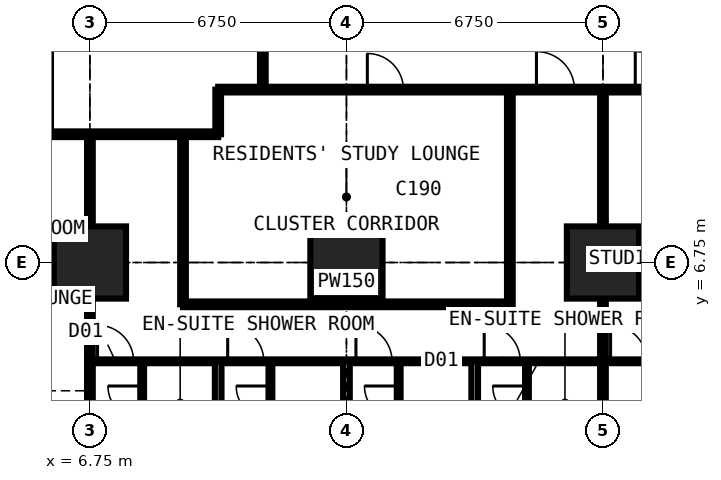
"""IFC4 building model, lengths in metres.
Left out: names, types, materials, properties, quantities, classifications, styles, units other than length and angle.
Written with IfcOpenShell. Run it as: python <this file> out.ifc"""

import sys

from ifc_helpers import new_model, si_unit, direction, frame, frame_2d, origin, origin_2d, place, context, subcontext, project, spatial, rectangle, extrude, element, fill, save


model = new_model("IFC4")
c1 = context("Model", 3, precision=1e-05, world=origin(), true_north=direction((0.0, 1.0)))
c2 = subcontext(c1, "Body", "Model", "MODEL_VIEW")
j1 = project(units=[si_unit("LENGTHUNIT", "METRE"), si_unit("PLANEANGLEUNIT", "RADIAN")], contexts=[c1])
p1 = place(None, origin())
s1 = spatial("IfcSite", under=j1, at=p1, CompositionType="ELEMENT")
p2 = place(p1, origin())
s2 = spatial("IfcBuilding", under=s1, at=p2, CompositionType="ELEMENT")
p3 = place(p2, frame((0.0, 0.0, 43.2)))
s3 = spatial("IfcBuildingStorey", under=s2, at=p3, CompositionType="ELEMENT", Elevation=43.2)
for number, where, z_axis, x_axis in (
    (1, (6.75, 6.75, 0.0), (0.0, 0.0, 1.0), (1.0, 0.0, 0.0)),
    (2, (13.5, 6.75, 0.0), (0.0, 0.0, 1.0), (1.0, 0.0, 0.0)),
    (3, (20.25, 6.75, 0.0), (0.0, 0.0, 1.0), (1.0, 0.0, 0.0)),
):
    element("IfcColumn", number, at=place(p3, frame(where, z_axis=z_axis, x_axis=x_axis)), inside=s3, PredefinedType="COLUMN", context=c2, shape_type="SweptSolid", body=[
        extrude(rectangle(XDim=1.9, YDim=1.9, at=origin_2d()), origin(), (0.0, 0.0, 1.0), 3.6),
    ])
p4 = place(p3, frame((-0.734, 10.125, 0.0), z_axis=(0.0, 0.0, 1.0), x_axis=(1.0, 0.0, 0.0)))
e4 = element("IfcWall", 4, at=p4, inside=s3, PredefinedType="PARTITIONING", context=c2, shape_type="SweptSolid", body=[
    extrude(rectangle(XDim=10.859, YDim=0.15, at=frame_2d((5.429, 0.0))), origin(), (0.0, 0.0, 1.0), 3.375),
])
p5 = place(p4, frame((5.134, 0.0, 0.0)))
e5 = element("IfcOpeningElement", 5, at=p5, cuts=e4, PredefinedType="OPENING", context=c2, shape_type="SweptSolid", body=[
    extrude(rectangle(XDim=1.0, YDim=2.2, at=frame_2d((0.5, 1.1))), frame((0.0, 0.085, 0.0), z_axis=(0.0, -1.0, 0.0), x_axis=(1.0, 0.0, 0.0)), (0.0, 0.0, 1.0), 0.17),
])
p6 = place(p3, frame((6.75, -0.734, 0.0), z_axis=(0.0, 0.0, 1.0), x_axis=(0.0, 1.0, 0.0)))
e6 = element("IfcWall", 6, at=p6, inside=s3, PredefinedType="PARTITIONING", context=c2, shape_type="SweptSolid", body=[
    extrude(rectangle(XDim=10.859, YDim=0.15, at=frame_2d((5.429, 0.0))), origin(), (0.0, 0.0, 1.0), 2.877),
])
p7 = place(p3, frame((6.75, 4.15, 0.0), z_axis=(0.0, 0.0, 1.0), x_axis=(1.0, 0.0, 0.0)))
e7 = element("IfcWall", 7, at=p7, inside=s3, PredefinedType="PARTITIONING", context=c2, shape_type="SweptSolid", body=[
    extrude(rectangle(XDim=23.625, YDim=0.1, at=frame_2d((11.812, 0.0))), origin(), (0.0, 0.0, 1.0), 3.375),
])
p8 = place(p7, frame((0.2, 0.0, 0.0)))
e8 = element("IfcOpeningElement", 8, at=p8, cuts=e7, PredefinedType="OPENING", context=c2, shape_type="SweptSolid", body=[
    extrude(rectangle(XDim=0.95, YDim=2.2, at=frame_2d((0.475, 1.1))), frame((0.0, 0.06, 0.0), z_axis=(0.0, -1.0, 0.0), x_axis=(1.0, 0.0, 0.0)), (0.0, 0.0, 1.0), 0.12),
])
p9 = place(p7, frame((3.625, 0.0, 0.0)))
e9 = element("IfcOpeningElement", 9, at=p9, cuts=e7, PredefinedType="OPENING", context=c2, shape_type="SweptSolid", body=[
    extrude(rectangle(XDim=0.95, YDim=2.2, at=frame_2d((0.475, 1.1))), frame((0.0, 0.06, 0.0), z_axis=(0.0, -1.0, 0.0), x_axis=(1.0, 0.0, 0.0)), (0.0, 0.0, 1.0), 0.12),
])
p10 = place(p7, frame((7.0, 0.0, 0.0)))
e10 = element("IfcOpeningElement", 10, at=p10, cuts=e7, PredefinedType="OPENING", context=c2, shape_type="SweptSolid", body=[
    extrude(rectangle(XDim=0.95, YDim=2.2, at=frame_2d((0.475, 1.1))), frame((0.0, 0.06, 0.0), z_axis=(0.0, -1.0, 0.0), x_axis=(1.0, 0.0, 0.0)), (0.0, 0.0, 1.0), 0.12),
])
p11 = place(p7, frame((10.375, 0.0, 0.0)))
e11 = element("IfcOpeningElement", 11, at=p11, cuts=e7, PredefinedType="OPENING", context=c2, shape_type="SweptSolid", body=[
    extrude(rectangle(XDim=0.95, YDim=2.2, at=frame_2d((0.475, 1.1))), frame((0.0, 0.06, 0.0), z_axis=(0.0, -1.0, 0.0), x_axis=(1.0, 0.0, 0.0)), (0.0, 0.0, 1.0), 0.12),
])
p12 = place(p7, frame((18.475, 0.0, 0.0)))
e12 = element("IfcOpeningElement", 12, at=p12, cuts=e7, PredefinedType="OPENING", context=c2, shape_type="SweptSolid", body=[
    extrude(rectangle(XDim=0.95, YDim=2.2, at=frame_2d((0.475, 1.1))), frame((0.0, 0.06, 0.0), z_axis=(0.0, -1.0, 0.0), x_axis=(1.0, 0.0, 0.0)), (0.0, 0.0, 1.0), 0.12),
])
p13 = place(p7, frame((13.7, 0.0, 0.0)))
e13 = element("IfcOpeningElement", 13, at=p13, cuts=e7, PredefinedType="OPENING", context=c2, shape_type="SweptSolid", body=[
    extrude(rectangle(XDim=0.95, YDim=2.2, at=frame_2d((0.475, 1.1))), frame((0.0, 0.06, 0.0), z_axis=(0.0, -1.0, 0.0), x_axis=(1.0, 0.0, 0.0)), (0.0, 0.0, 1.0), 0.12),
])
p14 = place(p3, frame((8.125, 1.95, 0.0), z_axis=(0.0, 0.0, 1.0), x_axis=(0.0, 1.0, 0.0)))
e14 = element("IfcWall", 14, at=p14, inside=s3, PredefinedType="PARTITIONING", context=c2, shape_type="SweptSolid", body=[
    extrude(rectangle(XDim=2.2, YDim=0.1, at=frame_2d((1.1, 0.0))), origin(), (0.0, 0.0, 1.0), 3.375),
])
p15 = place(p14, frame((0.65, 0.0, 0.0)))
e15 = element("IfcOpeningElement", 15, at=p15, cuts=e14, PredefinedType="OPENING", context=c2, shape_type="SweptSolid", body=[
    extrude(rectangle(XDim=0.9, YDim=2.2, at=frame_2d((0.45, 1.1))), frame((0.0, 0.06, 0.0), z_axis=(0.0, -1.0, 0.0), x_axis=(1.0, 0.0, 0.0)), (0.0, 0.0, 1.0), 0.12),
])
p16 = place(p3, frame((9.2, 5.65, 0.0), z_axis=(0.0, 0.0, 1.0), x_axis=(0.0, 1.0, 0.0)))
e16 = element("IfcWall", 16, at=p16, inside=s3, PredefinedType="PARTITIONING", context=c2, shape_type="SweptSolid", body=[
    extrude(rectangle(XDim=4.475, YDim=0.15, at=frame_2d((2.238, 0.0))), origin(), (0.0, 0.0, 1.0), 3.375),
])
p17 = place(p3, frame((9.2, 5.65, 0.0), z_axis=(0.0, 0.0, 1.0), x_axis=(1.0, 0.0, 0.0)))
e17 = element("IfcWall", 17, at=p17, inside=s3, PredefinedType="PARTITIONING", context=c2, shape_type="SweptSolid", body=[
    extrude(rectangle(XDim=8.6, YDim=0.15, at=frame_2d((4.3, 0.0))), origin(), (0.0, 0.0, 1.0), 3.375),
])
p18 = place(p3, frame((10.125, -0.734, 0.0), z_axis=(0.0, 0.0, 1.0), x_axis=(0.0, 1.0, 0.0)))
e18 = element("IfcWall", 18, at=p18, inside=s3, PredefinedType="PARTITIONING", context=c2, shape_type="SweptSolid", body=[
    extrude(rectangle(XDim=4.884, YDim=0.175, at=frame_2d((2.442, 0.0))), origin(), (0.0, 0.0, 1.0), 3.375),
])
p19 = place(p3, frame((10.125, 10.125, 0.0), z_axis=(0.0, 0.0, 1.0), x_axis=(0.0, 1.0, 0.0)))
e19 = element("IfcWall", 19, at=p19, inside=s3, PredefinedType="PARTITIONING", context=c2, shape_type="SweptSolid", body=[
    extrude(rectangle(XDim=1.175, YDim=0.15, at=frame_2d((0.587, 0.0))), origin(), (0.0, 0.0, 1.0), 3.375),
])
p20 = place(p3, frame((10.125, 11.3, 0.0), z_axis=(0.0, 0.0, 1.0), x_axis=(1.0, 0.0, 0.0)))
e20 = element("IfcWall", 20, at=p20, inside=s3, PredefinedType="PARTITIONING", context=c2, shape_type="SweptSolid", body=[
    extrude(rectangle(XDim=20.675, YDim=0.15, at=frame_2d((10.337, 0.0))), origin(), (0.0, 0.0, 1.0), 3.375),
])
p21 = place(p20, frame((8.375, 0.0, 0.0)))
e21 = element("IfcOpeningElement", 21, at=p21, cuts=e20, PredefinedType="OPENING", context=c2, shape_type="SweptSolid", body=[
    extrude(rectangle(XDim=1.0, YDim=2.2, at=frame_2d((0.5, 1.1))), frame((0.0, 0.085, 0.0), z_axis=(0.0, -1.0, 0.0), x_axis=(1.0, 0.0, 0.0)), (0.0, 0.0, 1.0), 0.17),
])
p22 = place(p20, frame((10.975, 0.0, 0.0)))
e22 = element("IfcOpeningElement", 22, at=p22, cuts=e20, PredefinedType="OPENING", context=c2, shape_type="SweptSolid", body=[
    extrude(rectangle(XDim=1.0, YDim=2.2, at=frame_2d((0.5, 1.1))), frame((0.0, 0.085, 0.0), z_axis=(0.0, -1.0, 0.0), x_axis=(1.0, 0.0, 0.0)), (0.0, 0.0, 1.0), 0.17),
])
p23 = place(p20, frame((3.925, 0.0, 0.0)))
e23 = element("IfcOpeningElement", 23, at=p23, cuts=e20, PredefinedType="OPENING", context=c2, shape_type="SweptSolid", body=[
    extrude(rectangle(XDim=0.95, YDim=2.2, at=frame_2d((0.475, 1.1))), frame((0.0, 0.085, 0.0), z_axis=(0.0, -1.0, 0.0), x_axis=(1.0, 0.0, 0.0)), (0.0, 0.0, 1.0), 0.17),
])
p24 = place(p3, frame((11.3, 11.3, 0.0), z_axis=(0.0, 0.0, 1.0), x_axis=(0.0, 1.0, 0.0)))
e24 = element("IfcWall", 24, at=p24, inside=s3, PredefinedType="PARTITIONING", context=c2, shape_type="SweptSolid", body=[
    extrude(rectangle(XDim=19.075, YDim=0.15, at=frame_2d((9.538, 0.0))), origin(), (0.0, 0.0, 1.0), 3.375),
])
p25 = place(p24, frame((12.875, 0.0, 0.0)))
e25 = element("IfcOpeningElement", 25, at=p25, cuts=e24, PredefinedType="OPENING", context=c2, shape_type="SweptSolid", body=[
    extrude(rectangle(XDim=1.0, YDim=2.2, at=frame_2d((0.5, 1.1))), frame((0.0, 0.085, 0.0), z_axis=(0.0, -1.0, 0.0), x_axis=(1.0, 0.0, 0.0)), (0.0, 0.0, 1.0), 0.17),
])
p26 = place(p24, frame((10.438, 0.0, 0.0)))
e26 = element("IfcOpeningElement", 26, at=p26, cuts=e24, PredefinedType="OPENING", context=c2, shape_type="SweptSolid", body=[
    extrude(rectangle(XDim=1.0, YDim=2.2, at=frame_2d((0.5, 1.1))), frame((0.0, 0.085, 0.0), z_axis=(0.0, -1.0, 0.0), x_axis=(1.0, 0.0, 0.0)), (0.0, 0.0, 1.0), 0.17),
])
p27 = place(p24, frame((15.675, 0.0, 0.0)))
e27 = element("IfcOpeningElement", 27, at=p27, cuts=e24, PredefinedType="OPENING", context=c2, shape_type="SweptSolid", body=[
    extrude(rectangle(XDim=0.95, YDim=2.2, at=frame_2d((0.475, 1.1))), frame((0.0, 0.085, 0.0), z_axis=(0.0, -1.0, 0.0), x_axis=(1.0, 0.0, 0.0)), (0.0, 0.0, 1.0), 0.17),
])
p28 = place(p3, frame((11.5, 1.95, 0.0), z_axis=(0.0, 0.0, 1.0), x_axis=(0.0, 1.0, 0.0)))
e28 = element("IfcWall", 28, at=p28, inside=s3, PredefinedType="PARTITIONING", context=c2, shape_type="SweptSolid", body=[
    extrude(rectangle(XDim=2.2, YDim=0.1, at=frame_2d((1.1, 0.0))), origin(), (0.0, 0.0, 1.0), 3.375),
])
p29 = place(p28, frame((0.65, 0.0, 0.0)))
e29 = element("IfcOpeningElement", 29, at=p29, cuts=e28, PredefinedType="OPENING", context=c2, shape_type="SweptSolid", body=[
    extrude(rectangle(XDim=0.9, YDim=2.2, at=frame_2d((0.45, 1.1))), frame((0.0, 0.06, 0.0), z_axis=(0.0, -1.0, 0.0), x_axis=(1.0, 0.0, 0.0)), (0.0, 0.0, 1.0), 0.12),
])
p30 = place(p3, frame((13.5, -0.734, 0.0), z_axis=(0.0, 0.0, 1.0), x_axis=(0.0, 1.0, 0.0)))
e30 = element("IfcWall", 30, at=p30, inside=s3, PredefinedType="PARTITIONING", context=c2, shape_type="SweptSolid", body=[
    extrude(rectangle(XDim=4.884, YDim=0.175, at=frame_2d((2.442, 0.0))), origin(), (0.0, 0.0, 1.0), 2.61),
])
p31 = place(p3, frame((14.875, 1.95, 0.0), z_axis=(0.0, 0.0, 1.0), x_axis=(0.0, 1.0, 0.0)))
e31 = element("IfcWall", 31, at=p31, inside=s3, PredefinedType="PARTITIONING", context=c2, shape_type="SweptSolid", body=[
    extrude(rectangle(XDim=2.2, YDim=0.1, at=frame_2d((1.1, 0.0))), origin(), (0.0, 0.0, 1.0), 3.375),
])
p32 = place(p31, frame((0.65, 0.0, 0.0)))
e32 = element("IfcOpeningElement", 32, at=p32, cuts=e31, PredefinedType="OPENING", context=c2, shape_type="SweptSolid", body=[
    extrude(rectangle(XDim=0.9, YDim=2.2, at=frame_2d((0.45, 1.1))), frame((0.0, 0.06, 0.0), z_axis=(0.0, -1.0, 0.0), x_axis=(1.0, 0.0, 0.0)), (0.0, 0.0, 1.0), 0.12),
])
p33 = place(p3, frame((16.875, -0.734, 0.0), z_axis=(0.0, 0.0, 1.0), x_axis=(0.0, 1.0, 0.0)))
e33 = element("IfcWall", 33, at=p33, inside=s3, PredefinedType="PARTITIONING", context=c2, shape_type="SweptSolid", body=[
    extrude(rectangle(XDim=4.884, YDim=0.175, at=frame_2d((2.442, 0.0))), origin(), (0.0, 0.0, 1.0), 3.375),
])
p34 = place(p3, frame((17.8, 5.65, 0.0), z_axis=(0.0, 0.0, 1.0), x_axis=(0.0, 1.0, 0.0)))
e34 = element("IfcWall", 34, at=p34, inside=s3, PredefinedType="PARTITIONING", context=c2, shape_type="SweptSolid", body=[
    extrude(rectangle(XDim=5.65, YDim=0.15, at=frame_2d((2.825, 0.0))), origin(), (0.0, 0.0, 1.0), 3.375),
])
p35 = place(p3, frame((18.25, 1.95, 0.0), z_axis=(0.0, 0.0, 1.0), x_axis=(0.0, 1.0, 0.0)))
e35 = element("IfcWall", 35, at=p35, inside=s3, PredefinedType="PARTITIONING", context=c2, shape_type="SweptSolid", body=[
    extrude(rectangle(XDim=2.2, YDim=0.1, at=frame_2d((1.1, 0.0))), origin(), (0.0, 0.0, 1.0), 3.375),
])
p36 = place(p35, frame((0.65, 0.0, 0.0)))
e36 = element("IfcOpeningElement", 36, at=p36, cuts=e35, PredefinedType="OPENING", context=c2, shape_type="SweptSolid", body=[
    extrude(rectangle(XDim=0.9, YDim=2.2, at=frame_2d((0.45, 1.1))), frame((0.0, 0.06, 0.0), z_axis=(0.0, -1.0, 0.0), x_axis=(1.0, 0.0, 0.0)), (0.0, 0.0, 1.0), 0.12),
])
p37 = place(p3, frame((20.25, -0.734, 0.0), z_axis=(0.0, 0.0, 1.0), x_axis=(0.0, 1.0, 0.0)))
e37 = element("IfcWall", 37, at=p37, inside=s3, PredefinedType="PARTITIONING", context=c2, shape_type="SweptSolid", body=[
    extrude(rectangle(XDim=12.034, YDim=0.15, at=frame_2d((6.017, 0.0))), origin(), (0.0, 0.0, 1.0), 2.61),
])
p38 = place(p8, origin())
e38 = element("IfcDoor", 38, at=p38, inside=s3, OperationType="SINGLE_SWING_LEFT", PredefinedType="DOOR", context=c2, shape_type="SweptSolid", body=[
    extrude(rectangle(XDim=0.95, YDim=2.2, at=frame_2d((0.475, 1.1))), frame((0.0, 0.025, 0.0), z_axis=(0.0, -1.0, 0.0), x_axis=(1.0, 0.0, 0.0)), (0.0, 0.0, 1.0), 0.05),
])
fill(e8, e38)
p39 = place(p15, origin())
e39 = element("IfcDoor", 39, at=p39, inside=s3, OperationType="SINGLE_SWING_RIGHT", PredefinedType="DOOR", context=c2, shape_type="SweptSolid", body=[
    extrude(rectangle(XDim=0.9, YDim=2.2, at=frame_2d((0.45, 1.1))), frame((0.0, 0.025, 0.0), z_axis=(0.0, -1.0, 0.0), x_axis=(1.0, 0.0, 0.0)), (0.0, 0.0, 1.0), 0.05),
])
fill(e15, e39)
p40 = place(p9, origin())
e40 = element("IfcDoor", 40, at=p40, inside=s3, OperationType="SINGLE_SWING_LEFT", PredefinedType="DOOR", context=c2, shape_type="SweptSolid", body=[
    extrude(rectangle(XDim=0.95, YDim=2.2, at=frame_2d((0.475, 1.1))), frame((0.0, 0.025, 0.0), z_axis=(0.0, -1.0, 0.0), x_axis=(1.0, 0.0, 0.0)), (0.0, 0.0, 1.0), 0.05),
])
fill(e9, e40)
p41 = place(p29, origin())
e41 = element("IfcDoor", 41, at=p41, inside=s3, OperationType="SINGLE_SWING_RIGHT", PredefinedType="DOOR", context=c2, shape_type="SweptSolid", body=[
    extrude(rectangle(XDim=0.9, YDim=2.2, at=frame_2d((0.45, 1.1))), frame((0.0, 0.025, 0.0), z_axis=(0.0, -1.0, 0.0), x_axis=(1.0, 0.0, 0.0)), (0.0, 0.0, 1.0), 0.05),
])
fill(e29, e41)
p42 = place(p10, origin())
e42 = element("IfcDoor", 42, at=p42, inside=s3, OperationType="SINGLE_SWING_LEFT", PredefinedType="DOOR", context=c2, shape_type="SweptSolid", body=[
    extrude(rectangle(XDim=0.95, YDim=2.2, at=frame_2d((0.475, 1.1))), frame((0.0, 0.025, 0.0), z_axis=(0.0, -1.0, 0.0), x_axis=(1.0, 0.0, 0.0)), (0.0, 0.0, 1.0), 0.05),
])
fill(e10, e42)
p43 = place(p32, origin())
e43 = element("IfcDoor", 43, at=p43, inside=s3, OperationType="SINGLE_SWING_RIGHT", PredefinedType="DOOR", context=c2, shape_type="SweptSolid", body=[
    extrude(rectangle(XDim=0.9, YDim=2.2, at=frame_2d((0.45, 1.1))), frame((0.0, 0.025, 0.0), z_axis=(0.0, -1.0, 0.0), x_axis=(1.0, 0.0, 0.0)), (0.0, 0.0, 1.0), 0.05),
])
fill(e32, e43)
p44 = place(p11, origin())
e44 = element("IfcDoor", 44, at=p44, inside=s3, OperationType="SINGLE_SWING_LEFT", PredefinedType="DOOR", context=c2, shape_type="SweptSolid", body=[
    extrude(rectangle(XDim=0.95, YDim=2.2, at=frame_2d((0.475, 1.1))), frame((0.0, 0.025, 0.0), z_axis=(0.0, -1.0, 0.0), x_axis=(1.0, 0.0, 0.0)), (0.0, 0.0, 1.0), 0.05),
])
fill(e11, e44)
p45 = place(p36, origin())
e45 = element("IfcDoor", 45, at=p45, inside=s3, OperationType="SINGLE_SWING_RIGHT", PredefinedType="DOOR", context=c2, shape_type="SweptSolid", body=[
    extrude(rectangle(XDim=0.9, YDim=2.2, at=frame_2d((0.45, 1.1))), frame((0.0, 0.025, 0.0), z_axis=(0.0, -1.0, 0.0), x_axis=(1.0, 0.0, 0.0)), (0.0, 0.0, 1.0), 0.05),
])
fill(e36, e45)
p46 = place(p21, origin())
e46 = element("IfcDoor", 46, at=p46, inside=s3, OperationType="SINGLE_SWING_LEFT", PredefinedType="DOOR", context=c2, shape_type="SweptSolid", body=[
    extrude(rectangle(XDim=1.0, YDim=2.2, at=frame_2d((0.5, 1.1))), frame((0.0, 0.025, 0.0), z_axis=(0.0, -1.0, 0.0), x_axis=(1.0, 0.0, 0.0)), (0.0, 0.0, 1.0), 0.05),
])
fill(e21, e46)
p47 = place(p13, origin())
e47 = element("IfcDoor", 47, at=p47, inside=s3, OperationType="SINGLE_SWING_LEFT", PredefinedType="DOOR", context=c2, shape_type="SweptSolid", body=[
    extrude(rectangle(XDim=0.95, YDim=2.2, at=frame_2d((0.475, 1.1))), frame((0.0, 0.025, 0.0), z_axis=(0.0, -1.0, 0.0), x_axis=(1.0, 0.0, 0.0)), (0.0, 0.0, 1.0), 0.05),
])
fill(e13, e47)
p48 = place(p22, origin())
e48 = element("IfcDoor", 48, at=p48, inside=s3, OperationType="SINGLE_SWING_LEFT", PredefinedType="DOOR", context=c2, shape_type="SweptSolid", body=[
    extrude(rectangle(XDim=1.0, YDim=2.2, at=frame_2d((0.5, 1.1))), frame((0.0, 0.025, 0.0), z_axis=(0.0, -1.0, 0.0), x_axis=(1.0, 0.0, 0.0)), (0.0, 0.0, 1.0), 0.05),
])
fill(e22, e48)
p49 = place(p23, origin())
e49 = element("IfcDoor", 49, at=p49, inside=s3, OperationType="SINGLE_SWING_LEFT", PredefinedType="DOOR", context=c2, shape_type="SweptSolid", body=[
    extrude(rectangle(XDim=0.95, YDim=2.2, at=frame_2d((0.475, 1.1))), frame((0.0, 0.025, 0.0), z_axis=(0.0, -1.0, 0.0), x_axis=(1.0, 0.0, 0.0)), (0.0, 0.0, 1.0), 0.05),
])
fill(e23, e49)
save(model, sys.argv[1])
